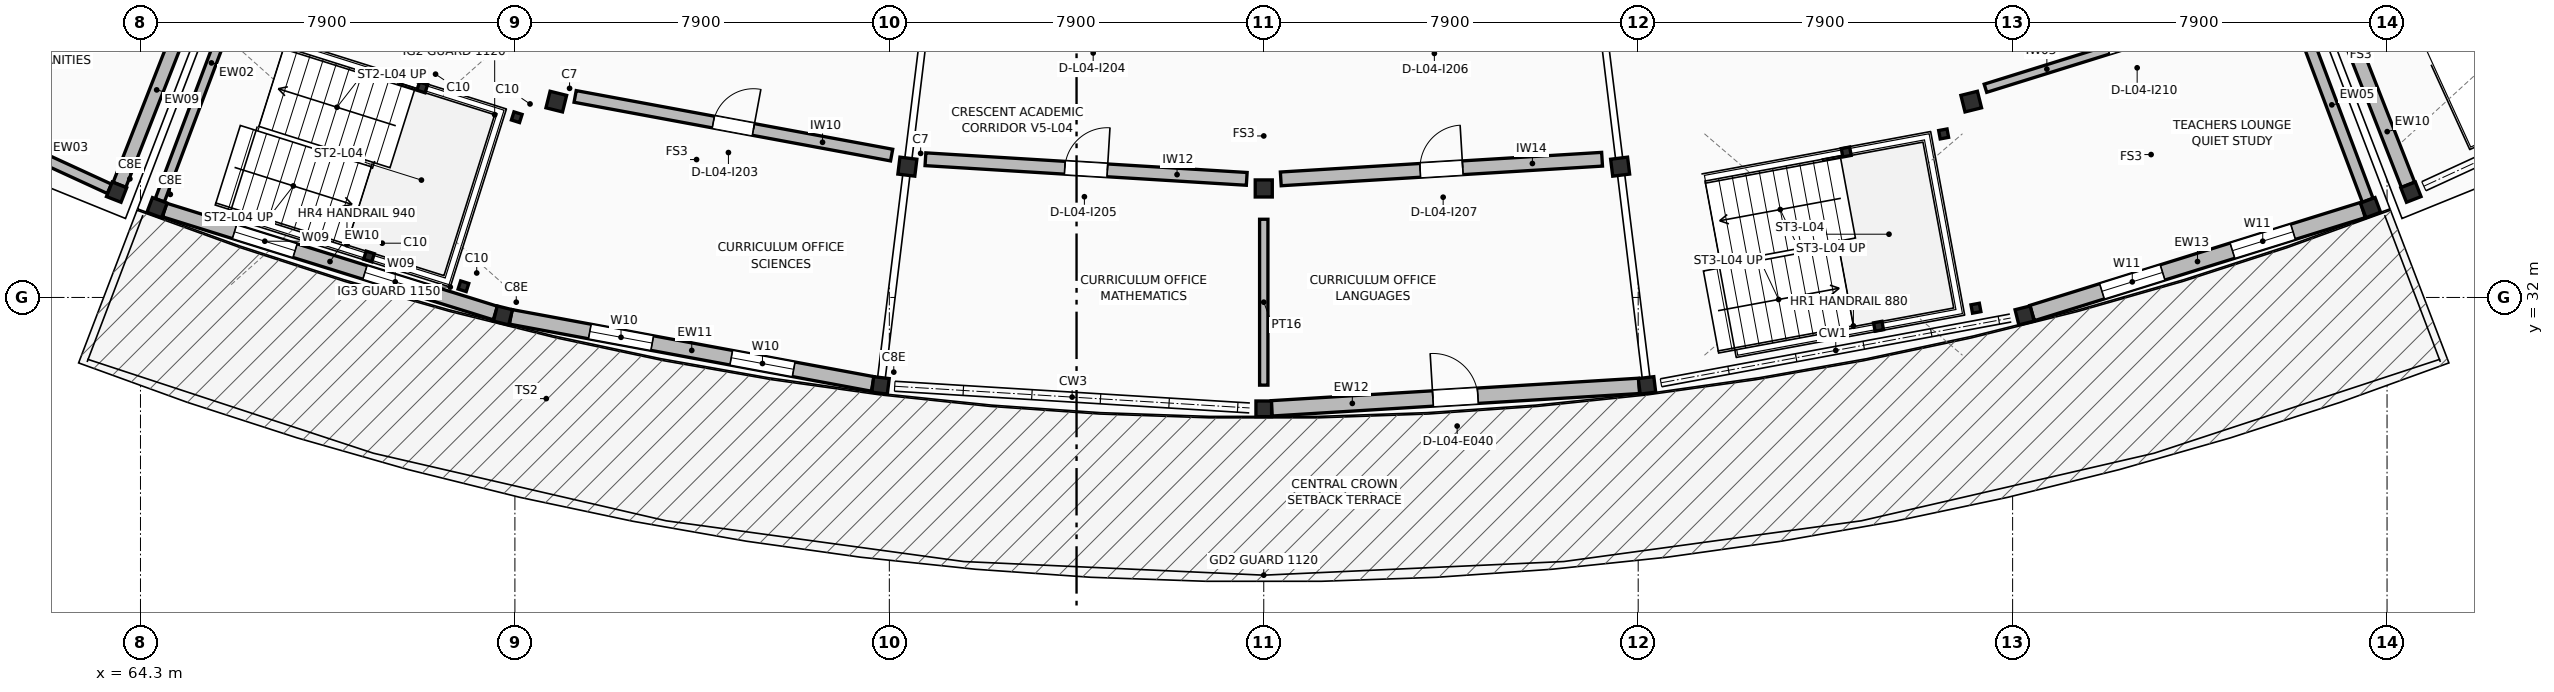
"""IFC4 building model, lengths in metres.
Left out: names, types, materials, properties, quantities, classifications, styles, units other than length and angle.
Written with IfcOpenShell. Run it as: python <this file> out.ifc"""

import sys

from ifc_helpers import new_model, si_unit, direction, frame, frame_2d, origin, origin_2d, place, context, subcontext, project, spatial, rectangle, hollow_rectangle, extrude, element, fill, save


model = new_model("IFC4")
c1 = context("Model", 3, precision=1e-05, world=origin(), true_north=direction((0.0, 1.0)))
c2 = subcontext(c1, "Body", "Model", "MODEL_VIEW")
j1 = project(units=[si_unit("LENGTHUNIT", "METRE"), si_unit("PLANEANGLEUNIT", "RADIAN")], contexts=[c1])
p1 = place(None, origin())
s1 = spatial("IfcSite", under=j1, at=p1, CompositionType="ELEMENT")
p2 = place(p1, origin())
s2 = spatial("IfcBuilding", under=s1, at=p2, CompositionType="ELEMENT")
p3 = place(p2, frame((0.0, 0.0, 15.64)))
s3 = spatial("IfcBuildingStorey", under=s2, at=p3, CompositionType="ELEMENT", Elevation=15.64)
for number, where, z_axis, x_axis in (
    (1, (63.796, 34.222, 0.0), (0.0, 0.0, 1.0), (-0.365, -0.931, 0.0)),
    (2, (64.649, 33.895, 0.0), (0.0, 0.0, 1.0), (-0.352, -0.936, 0.0)),
):
    element("IfcColumn", number, at=place(p3, frame(where, z_axis=z_axis, x_axis=x_axis)), inside=s3, PredefinedType="COLUMN", context=c2, shape_type="SweptSolid", body=[
        extrude(rectangle(XDim=0.33, YDim=0.33, at=origin_2d()), origin(), (0.0, 0.0, 1.0), 3.74),
    ])
p4 = place(p3, frame((73.073, 36.133, 0.0), z_axis=(0.0, 0.0, 1.0), x_axis=(-0.2419218956, -0.970295726276, 0.0)))
e3 = element("IfcColumn", 3, at=p4, inside=s3, PredefinedType="COLUMN", context=c2, shape_type="SweptSolid", body=[
    extrude(rectangle(XDim=0.36, YDim=0.36, at=origin_2d()), origin(), (0.0, 0.0, 1.0), 3.74),
])
p5 = place(p3, frame((71.948, 31.621, 0.0), z_axis=(0.0, 0.0, 1.0), x_axis=(-0.2419218956, -0.970295726276, 0.0)))
e4 = element("IfcColumn", 4, at=p5, inside=s3, PredefinedType="COLUMN", context=c2, shape_type="SweptSolid", body=[
    extrude(rectangle(XDim=0.33, YDim=0.33, at=origin_2d()), origin(), (0.0, 0.0, 1.0), 3.74),
])
p6 = place(p3, frame((80.481, 34.76, 0.0), z_axis=(0.0, 0.0, 1.0), x_axis=(-0.121869343405, -0.992546151641, 0.0)))
e5 = element("IfcColumn", 5, at=p6, inside=s3, PredefinedType="COLUMN", context=c2, shape_type="SweptSolid", body=[
    extrude(rectangle(XDim=0.36, YDim=0.36, at=origin_2d()), origin(), (0.0, 0.0, 1.0), 3.74),
])
p7 = place(p3, frame((79.914, 30.145, 0.0), z_axis=(0.0, 0.0, 1.0), x_axis=(-0.121869343405, -0.992546151641, 0.0)))
e6 = element("IfcColumn", 6, at=p7, inside=s3, PredefinedType="COLUMN", context=c2, shape_type="SweptSolid", body=[
    extrude(rectangle(XDim=0.33, YDim=0.33, at=origin_2d()), origin(), (0.0, 0.0, 1.0), 3.74),
])
p8 = place(p3, frame((88.0, 34.3, 0.0), z_axis=(0.0, 0.0, 1.0), x_axis=(0.0, -1.0, 0.0)))
e7 = element("IfcColumn", 7, at=p8, inside=s3, PredefinedType="COLUMN", context=c2, shape_type="SweptSolid", body=[
    extrude(rectangle(XDim=0.36, YDim=0.36, at=origin_2d()), origin(), (0.0, 0.0, 1.0), 3.74),
])
p9 = place(p3, frame((88.0, 29.65, 0.0), z_axis=(0.0, 0.0, 1.0), x_axis=(0.0, -1.0, 0.0)))
e8 = element("IfcColumn", 8, at=p9, inside=s3, PredefinedType="COLUMN", context=c2, shape_type="SweptSolid", body=[
    extrude(rectangle(XDim=0.33, YDim=0.33, at=origin_2d()), origin(), (0.0, 0.0, 1.0), 3.74),
])
p10 = place(p3, frame((95.519, 34.76, 0.0), z_axis=(0.0, 0.0, 1.0), x_axis=(0.121869343405, -0.992546151641, 0.0)))
e9 = element("IfcColumn", 9, at=p10, inside=s3, PredefinedType="COLUMN", context=c2, shape_type="SweptSolid", body=[
    extrude(rectangle(XDim=0.36, YDim=0.36, at=origin_2d()), origin(), (0.0, 0.0, 1.0), 3.74),
])
p11 = place(p3, frame((96.086, 30.145, 0.0), z_axis=(0.0, 0.0, 1.0), x_axis=(0.121869343405, -0.992546151641, 0.0)))
e10 = element("IfcColumn", 10, at=p11, inside=s3, PredefinedType="COLUMN", context=c2, shape_type="SweptSolid", body=[
    extrude(rectangle(XDim=0.33, YDim=0.33, at=origin_2d()), origin(), (0.0, 0.0, 1.0), 3.74),
])
p12 = place(p3, frame((102.927, 36.133, 0.0), z_axis=(0.0, 0.0, 1.0), x_axis=(0.2419218956, -0.970295726276, 0.0)))
e11 = element("IfcColumn", 11, at=p12, inside=s3, PredefinedType="COLUMN", context=c2, shape_type="SweptSolid", body=[
    extrude(rectangle(XDim=0.36, YDim=0.36, at=origin_2d()), origin(), (0.0, 0.0, 1.0), 3.74),
])
for number, where, z_axis, x_axis in (
    (12, (104.052, 31.621, 0.0), (0.0, 0.0, 1.0), (0.242, -0.97, 0.0)),
    (13, (111.351, 33.895, 0.0), (0.0, 0.0, 1.0), (0.352, -0.936, 0.0)),
    (14, (112.204, 34.222, 0.0), (0.0, 0.0, 1.0), (0.365, -0.931, 0.0)),
):
    element("IfcColumn", number, at=place(p3, frame(where, z_axis=z_axis, x_axis=x_axis)), inside=s3, PredefinedType="COLUMN", context=c2, shape_type="SweptSolid", body=[
        extrude(rectangle(XDim=0.33, YDim=0.33, at=origin_2d()), origin(), (0.0, 0.0, 1.0), 3.74),
    ])
p13 = place(p3, frame((57.003, 37.346, 0.0), z_axis=(0.0, 0.0, 1.0), x_axis=(0.908528493203, -0.417822901525, 0.0)))
e15 = element("IfcWall", 15, at=p13, inside=s3, PredefinedType="STANDARD", context=c2, shape_type="SweptSolid", body=[
    extrude(rectangle(XDim=7.309, YDim=0.216, at=frame_2d((3.655, 0.0))), origin(), (0.0, 0.0, 1.0), 2.82),
])
p14 = place(p13, frame((1.623, 0.0, 0.95)))
e16 = element("IfcOpeningElement", 16, at=p14, cuts=e15, PredefinedType="OPENING", context=c2, shape_type="SweptSolid", body=[
    extrude(rectangle(XDim=1.22, YDim=1.6, at=frame_2d((0.61, 0.8))), frame((0.0, 0.118, 0.0), z_axis=(0.0, -1.0, 0.0), x_axis=(1.0, 0.0, 0.0)), (0.0, 0.0, 1.0), 0.236),
])
p15 = place(p13, frame((4.466, 0.0, 0.95)))
e17 = element("IfcOpeningElement", 17, at=p15, cuts=e15, PredefinedType="OPENING", context=c2, shape_type="SweptSolid", body=[
    extrude(rectangle(XDim=1.22, YDim=1.6, at=frame_2d((0.61, 0.8))), frame((0.0, 0.118, 0.0), z_axis=(0.0, -1.0, 0.0), x_axis=(1.0, 0.0, 0.0)), (0.0, 0.0, 1.0), 0.236),
])
p16 = place(p3, frame((65.426, 38.381, 0.0), z_axis=(0.0, 0.0, 1.0), x_axis=(-0.364771909001, -0.931096909244, 0.0)))
e18 = element("IfcWall", 18, at=p16, inside=s3, PredefinedType="STANDARD", context=c2, shape_type="SweptSolid", body=[
    extrude(rectangle(XDim=4.299, YDim=0.288, at=frame_2d((2.149, 0.0))), origin(), (0.0, 0.0, 1.0), 2.82),
])
p17 = place(p3, frame((64.81, 33.845, 0.0), z_axis=(0.0, 0.0, 1.0), x_axis=(0.954747645816, -0.297417102416, 0.0)))
e19 = element("IfcWall", 19, at=p17, inside=s3, PredefinedType="STANDARD", context=c2, shape_type="SweptSolid", body=[
    extrude(rectangle(XDim=7.309, YDim=0.3, at=frame_2d((3.655, 0.0))), origin(), (0.0, 0.0, 1.0), 2.82),
])
p18 = place(p17, frame((1.543, 0.0, 0.95)))
e20 = element("IfcOpeningElement", 20, at=p18, cuts=e19, PredefinedType="OPENING", context=c2, shape_type="SweptSolid", body=[
    extrude(rectangle(XDim=1.34, YDim=1.15, at=frame_2d((0.67, 0.575))), frame((0.0, 0.16, 0.0), z_axis=(0.0, -1.0, 0.0), x_axis=(1.0, 0.0, 0.0)), (0.0, 0.0, 1.0), 0.32),
])
p19 = place(p17, frame((4.426, 0.0, 0.95)))
e21 = element("IfcOpeningElement", 21, at=p19, cuts=e19, PredefinedType="OPENING", context=c2, shape_type="SweptSolid", body=[
    extrude(rectangle(XDim=1.34, YDim=1.15, at=frame_2d((0.67, 0.575))), frame((0.0, 0.16, 0.0), z_axis=(0.0, -1.0, 0.0), x_axis=(1.0, 0.0, 0.0)), (0.0, 0.0, 1.0), 0.32),
])
p20 = place(p3, frame((72.114, 31.59, 0.0), z_axis=(0.0, 0.0, 1.0), x_axis=(0.983255515732, -0.182232244082, 0.0)))
e22 = element("IfcWall", 22, at=p20, inside=s3, PredefinedType="STANDARD", context=c2, shape_type="SweptSolid", body=[
    extrude(rectangle(XDim=7.765, YDim=0.312, at=frame_2d((3.883, 0.0))), origin(), (0.0, 0.0, 1.0), 2.82),
])
p21 = place(p20, frame((1.695, 0.0, 0.95)))
e23 = element("IfcOpeningElement", 23, at=p21, cuts=e22, PredefinedType="OPENING", context=c2, shape_type="SweptSolid", body=[
    extrude(rectangle(XDim=1.34, YDim=1.3, at=frame_2d((0.67, 0.65))), frame((0.0, 0.166, 0.0), z_axis=(0.0, -1.0, 0.0), x_axis=(1.0, 0.0, 0.0)), (0.0, 0.0, 1.0), 0.332),
])
p22 = place(p20, frame((4.73, 0.0, 0.95)))
e24 = element("IfcOpeningElement", 24, at=p22, cuts=e22, PredefinedType="OPENING", context=c2, shape_type="SweptSolid", body=[
    extrude(rectangle(XDim=1.34, YDim=1.3, at=frame_2d((0.67, 0.65))), frame((0.0, 0.166, 0.0), z_axis=(0.0, -1.0, 0.0), x_axis=(1.0, 0.0, 0.0)), (0.0, 0.0, 1.0), 0.332),
])
p23 = place(p3, frame((88.168, 29.66, 0.0), z_axis=(0.0, 0.0, 1.0), x_axis=(0.998134280548, 0.061057006105, 0.0)))
e25 = element("IfcWall", 25, at=p23, inside=s3, PredefinedType="STANDARD", context=c2, shape_type="SweptSolid", body=[
    extrude(rectangle(XDim=7.765, YDim=0.324, at=frame_2d((3.883, 0.0))), origin(), (0.0, 0.0, 1.0), 2.82),
])
p24 = place(p23, frame((3.408, 0.0, 0.0)))
e26 = element("IfcOpeningElement", 26, at=p24, cuts=e25, PredefinedType="OPENING", context=c2, shape_type="SweptSolid", body=[
    extrude(rectangle(XDim=0.95, YDim=2.15, at=frame_2d((0.475, 1.075))), frame((0.0, 0.172, 0.0), z_axis=(0.0, -1.0, 0.0), x_axis=(1.0, 0.0, 0.0)), (0.0, 0.0, 1.0), 0.344),
])
p25 = place(p3, frame((104.212, 31.671, 0.0), z_axis=(0.0, 0.0, 1.0), x_axis=(0.954747645816, 0.297417102416, 0.0)))
e27 = element("IfcWall", 27, at=p25, inside=s3, PredefinedType="STANDARD", context=c2, shape_type="SweptSolid", body=[
    extrude(rectangle(XDim=7.309, YDim=0.336, at=frame_2d((3.655, 0.0))), origin(), (0.0, 0.0, 1.0), 2.82),
])
p26 = place(p25, frame((1.543, 0.0, 0.95)))
e28 = element("IfcOpeningElement", 28, at=p26, cuts=e27, PredefinedType="OPENING", context=c2, shape_type="SweptSolid", body=[
    extrude(rectangle(XDim=1.34, YDim=1.45, at=frame_2d((0.67, 0.725))), frame((0.0, 0.178, 0.0), z_axis=(0.0, -1.0, 0.0), x_axis=(1.0, 0.0, 0.0)), (0.0, 0.0, 1.0), 0.356),
])
p27 = place(p25, frame((4.426, 0.0, 0.95)))
e29 = element("IfcOpeningElement", 29, at=p27, cuts=e27, PredefinedType="OPENING", context=c2, shape_type="SweptSolid", body=[
    extrude(rectangle(XDim=1.34, YDim=1.45, at=frame_2d((0.67, 0.725))), frame((0.0, 0.178, 0.0), z_axis=(0.0, -1.0, 0.0), x_axis=(1.0, 0.0, 0.0)), (0.0, 0.0, 1.0), 0.356),
])
p28 = place(p3, frame((66.221, 38.076, 0.0), z_axis=(0.0, 0.0, 1.0), x_axis=(-0.351932384448, -0.936025425283, 0.0)))
e30 = element("IfcWall", 30, at=p28, inside=s3, PredefinedType="STANDARD", context=c2, shape_type="SweptSolid", body=[
    extrude(rectangle(XDim=4.299, YDim=0.204, at=frame_2d((2.149, 0.0))), origin(), (0.0, 0.0, 1.0), 2.82),
])
p29 = place(p3, frame((109.779, 38.076, 0.0), z_axis=(0.0, 0.0, 1.0), x_axis=(0.351932384448, -0.936025425283, 0.0)))
e31 = element("IfcWall", 31, at=p29, inside=s3, PredefinedType="STANDARD", context=c2, shape_type="SweptSolid", body=[
    extrude(rectangle(XDim=4.299, YDim=0.24, at=frame_2d((2.149, 0.0))), origin(), (0.0, 0.0, 1.0), 2.82),
])
p30 = place(p3, frame((110.574, 38.381, 0.0), z_axis=(0.0, 0.0, 1.0), x_axis=(0.364771909001, -0.931096909244, 0.0)))
e32 = element("IfcWall", 32, at=p30, inside=s3, PredefinedType="STANDARD", context=c2, shape_type="SweptSolid", body=[
    extrude(rectangle(XDim=4.299, YDim=0.3, at=frame_2d((2.149, 0.0))), origin(), (0.0, 0.0, 1.0), 2.82),
])
for number, where, z_axis, x_axis in (
    (33, (69.121, 32.865, 0.0), (0.0, 0.0, 1.0), (0.954, -0.301, 0.0)),
    (34, (70.246, 36.432, 0.0), (0.0, 0.0, 1.0), (0.954, -0.301, 0.0)),
    (35, (71.115, 32.236, 0.0), (0.0, 0.0, 1.0), (0.954, -0.301, 0.0)),
    (36, (72.239, 35.803, 0.0), (0.0, 0.0, 1.0), (0.954, -0.301, 0.0)),
    (37, (100.971, 31.392, 0.0), (0.0, 0.0, 1.0), (0.983, 0.182, 0.0)),
    (38, (100.29, 35.069, 0.0), (0.0, 0.0, 1.0), (0.983, 0.182, 0.0)),
    (39, (103.026, 31.773, 0.0), (0.0, 0.0, 1.0), (0.983, 0.182, 0.0)),
    (40, (102.344, 35.45, 0.0), (0.0, 0.0, 1.0), (0.983, 0.182, 0.0)),
):
    element("IfcColumn", number, at=place(p3, frame(where, z_axis=z_axis, x_axis=x_axis)), inside=s3, PredefinedType="COLUMN", context=c2, shape_type="SweptSolid", body=[
        extrude(hollow_rectangle(XDim=0.18, YDim=0.18, WallThickness=0.01, InnerFilletRadius=0.01, OuterFilletRadius=0.02, at=origin_2d()), origin(), (0.0, 0.0, 1.0), 1.675),
    ])
p31 = place(p3, frame((73.471, 36.242, 0.0), z_axis=(0.0, 0.0, 1.0), x_axis=(0.983257442509, -0.182221847619, 0.0)))
e41 = element("IfcWall", 41, at=p31, inside=s3, PredefinedType="STANDARD", context=c2, shape_type="SweptSolid", body=[
    extrude(rectangle(XDim=6.792, YDim=0.25, at=frame_2d((3.396, 0.0))), origin(), (0.0, 0.0, 1.0), 2.76),
])
p32 = place(p31, frame((2.966, 0.0, 0.0)))
e42 = element("IfcOpeningElement", 42, at=p32, cuts=e41, PredefinedType="OPENING", context=c2, shape_type="SweptSolid", body=[
    extrude(rectangle(XDim=0.86, YDim=2.24, at=frame_2d((0.43, 1.12))), frame((0.0, 0.135, 0.0), z_axis=(0.0, -1.0, 0.0), x_axis=(1.0, 0.0, 0.0)), (0.0, 0.0, 1.0), 0.27),
])
p33 = place(p3, frame((80.862, 34.917, 0.0), z_axis=(0.0, 0.0, 1.0), x_axis=(0.998135326973, -0.061039897184, 0.0)))
e43 = element("IfcWall", 43, at=p33, inside=s3, PredefinedType="STANDARD", context=c2, shape_type="SweptSolid", body=[
    extrude(rectangle(XDim=6.792, YDim=0.27, at=frame_2d((3.396, 0.0))), origin(), (0.0, 0.0, 1.0), 2.76),
])
p34 = place(p33, frame((2.946, 0.0, 0.0)))
e44 = element("IfcOpeningElement", 44, at=p34, cuts=e43, PredefinedType="OPENING", context=c2, shape_type="SweptSolid", body=[
    extrude(rectangle(XDim=0.9, YDim=2.12, at=frame_2d((0.45, 1.06))), frame((0.0, 0.145, 0.0), z_axis=(0.0, -1.0, 0.0), x_axis=(1.0, 0.0, 0.0)), (0.0, 0.0, 1.0), 0.29),
])
p35 = place(p3, frame((88.359, 34.502, 0.0), z_axis=(0.0, 0.0, 1.0), x_axis=(0.998135326973, 0.061039897184, 0.0)))
e45 = element("IfcWall", 45, at=p35, inside=s3, PredefinedType="STANDARD", context=c2, shape_type="SweptSolid", body=[
    extrude(rectangle(XDim=6.792, YDim=0.29, at=frame_2d((3.396, 0.0))), origin(), (0.0, 0.0, 1.0), 2.76),
])
p36 = place(p35, frame((2.946, 0.0, 0.0)))
e46 = element("IfcOpeningElement", 46, at=p36, cuts=e45, PredefinedType="OPENING", context=c2, shape_type="SweptSolid", body=[
    extrude(rectangle(XDim=0.9, YDim=2.24, at=frame_2d((0.45, 1.12))), frame((0.0, 0.155, 0.0), z_axis=(0.0, -1.0, 0.0), x_axis=(1.0, 0.0, 0.0)), (0.0, 0.0, 1.0), 0.31),
])
p37 = place(p3, frame((88.0, 33.65, 0.0), z_axis=(0.0, 0.0, 1.0), x_axis=(0.0, -1.0, 0.0)))
e47 = element("IfcWall", 47, at=p37, inside=s3, PredefinedType="PARTITIONING", context=c2, shape_type="SweptSolid", body=[
    extrude(rectangle(XDim=3.5, YDim=0.176, at=frame_2d((1.75, 0.0))), origin(), (0.0, 0.0, 1.0), 2.76),
])
p38 = place(p3, frame((103.227, 36.415, 0.0), z_axis=(0.0, 0.0, 1.0), x_axis=(0.954750390155, 0.297408292585, 0.0)))
e48 = element("IfcWall", 48, at=p38, inside=s3, PredefinedType="STANDARD", context=c2, shape_type="SweptSolid", body=[
    extrude(rectangle(XDim=6.368, YDim=0.18, at=frame_2d((3.184, 0.0))), origin(), (0.0, 0.0, 1.0), 2.76),
])
p39 = place(p38, frame((2.714, 0.0, 0.0)))
e49 = element("IfcOpeningElement", 49, at=p39, cuts=e48, PredefinedType="OPENING", context=c2, shape_type="SweptSolid", body=[
    extrude(rectangle(XDim=0.94, YDim=2.18, at=frame_2d((0.47, 1.09))), frame((0.0, 0.1, 0.0), z_axis=(0.0, -1.0, 0.0), x_axis=(1.0, 0.0, 0.0)), (0.0, 0.0, 1.0), 0.2),
])
p40 = place(p18, origin())
e50 = element("IfcWindow", 50, at=p40, inside=s3, PartitioningType="SINGLE_PANEL", PredefinedType="WINDOW", context=c2, shape_type="SweptSolid", body=[
    extrude(rectangle(XDim=1.34, YDim=1.15, at=frame_2d((0.67, 0.575))), frame((0.0, 0.03, 0.0), z_axis=(0.0, -1.0, 0.0), x_axis=(1.0, 0.0, 0.0)), (0.0, 0.0, 1.0), 0.06),
])
fill(e20, e50)
p41 = place(p19, origin())
e51 = element("IfcWindow", 51, at=p41, inside=s3, PartitioningType="SINGLE_PANEL", PredefinedType="WINDOW", context=c2, shape_type="SweptSolid", body=[
    extrude(rectangle(XDim=1.34, YDim=1.15, at=frame_2d((0.67, 0.575))), frame((0.0, 0.03, 0.0), z_axis=(0.0, -1.0, 0.0), x_axis=(1.0, 0.0, 0.0)), (0.0, 0.0, 1.0), 0.06),
])
fill(e21, e51)
p42 = place(p21, origin())
e52 = element("IfcWindow", 52, at=p42, inside=s3, PartitioningType="SINGLE_PANEL", PredefinedType="WINDOW", context=c2, shape_type="SweptSolid", body=[
    extrude(rectangle(XDim=1.34, YDim=1.3, at=frame_2d((0.67, 0.65))), frame((0.0, 0.03, 0.0), z_axis=(0.0, -1.0, 0.0), x_axis=(1.0, 0.0, 0.0)), (0.0, 0.0, 1.0), 0.06),
])
fill(e23, e52)
p43 = place(p22, origin())
e53 = element("IfcWindow", 53, at=p43, inside=s3, PartitioningType="SINGLE_PANEL", PredefinedType="WINDOW", context=c2, shape_type="SweptSolid", body=[
    extrude(rectangle(XDim=1.34, YDim=1.3, at=frame_2d((0.67, 0.65))), frame((0.0, 0.03, 0.0), z_axis=(0.0, -1.0, 0.0), x_axis=(1.0, 0.0, 0.0)), (0.0, 0.0, 1.0), 0.06),
])
fill(e24, e53)
p44 = place(p24, frame((0.95, 0.0, 0.0), z_axis=(0.0, 0.0, 1.0), x_axis=(-1.0, 0.0, 0.0)))
e54 = element("IfcDoor", 54, at=p44, inside=s3, OperationType="SINGLE_SWING_LEFT", PredefinedType="DOOR", context=c2, shape_type="SweptSolid", body=[
    extrude(rectangle(XDim=0.95, YDim=2.15, at=frame_2d((0.475, 1.075))), frame((0.0, 0.025, 0.0), z_axis=(0.0, -1.0, 0.0), x_axis=(1.0, 0.0, 0.0)), (0.0, 0.0, 1.0), 0.05),
])
fill(e26, e54)
p45 = place(p26, origin())
e55 = element("IfcWindow", 55, at=p45, inside=s3, PartitioningType="SINGLE_PANEL", PredefinedType="WINDOW", context=c2, shape_type="SweptSolid", body=[
    extrude(rectangle(XDim=1.34, YDim=1.45, at=frame_2d((0.67, 0.725))), frame((0.0, 0.03, 0.0), z_axis=(0.0, -1.0, 0.0), x_axis=(1.0, 0.0, 0.0)), (0.0, 0.0, 1.0), 0.06),
])
fill(e28, e55)
p46 = place(p27, origin())
e56 = element("IfcWindow", 56, at=p46, inside=s3, PartitioningType="SINGLE_PANEL", PredefinedType="WINDOW", context=c2, shape_type="SweptSolid", body=[
    extrude(rectangle(XDim=1.34, YDim=1.45, at=frame_2d((0.67, 0.725))), frame((0.0, 0.03, 0.0), z_axis=(0.0, -1.0, 0.0), x_axis=(1.0, 0.0, 0.0)), (0.0, 0.0, 1.0), 0.06),
])
fill(e29, e56)
p47 = place(p32, origin())
e57 = element("IfcDoor", 57, at=p47, inside=s3, OperationType="SINGLE_SWING_RIGHT", PredefinedType="DOOR", context=c2, shape_type="SweptSolid", body=[
    extrude(rectangle(XDim=0.86, YDim=2.24, at=frame_2d((0.43, 1.12))), frame((0.0, 0.025, 0.0), z_axis=(0.0, -1.0, 0.0), x_axis=(1.0, 0.0, 0.0)), (0.0, 0.0, 1.0), 0.05),
])
fill(e42, e57)
p48 = place(p34, origin())
e58 = element("IfcDoor", 58, at=p48, inside=s3, OperationType="SINGLE_SWING_RIGHT", PredefinedType="DOOR", context=c2, shape_type="SweptSolid", body=[
    extrude(rectangle(XDim=0.9, YDim=2.12, at=frame_2d((0.45, 1.06))), frame((0.0, 0.025, 0.0), z_axis=(0.0, -1.0, 0.0), x_axis=(1.0, 0.0, 0.0)), (0.0, 0.0, 1.0), 0.05),
])
fill(e44, e58)
p49 = place(p36, origin())
e59 = element("IfcDoor", 59, at=p49, inside=s3, OperationType="SINGLE_SWING_RIGHT", PredefinedType="DOOR", context=c2, shape_type="SweptSolid", body=[
    extrude(rectangle(XDim=0.9, YDim=2.24, at=frame_2d((0.45, 1.12))), frame((0.0, 0.025, 0.0), z_axis=(0.0, -1.0, 0.0), x_axis=(1.0, 0.0, 0.0)), (0.0, 0.0, 1.0), 0.05),
])
fill(e46, e59)
save(model, sys.argv[1])
